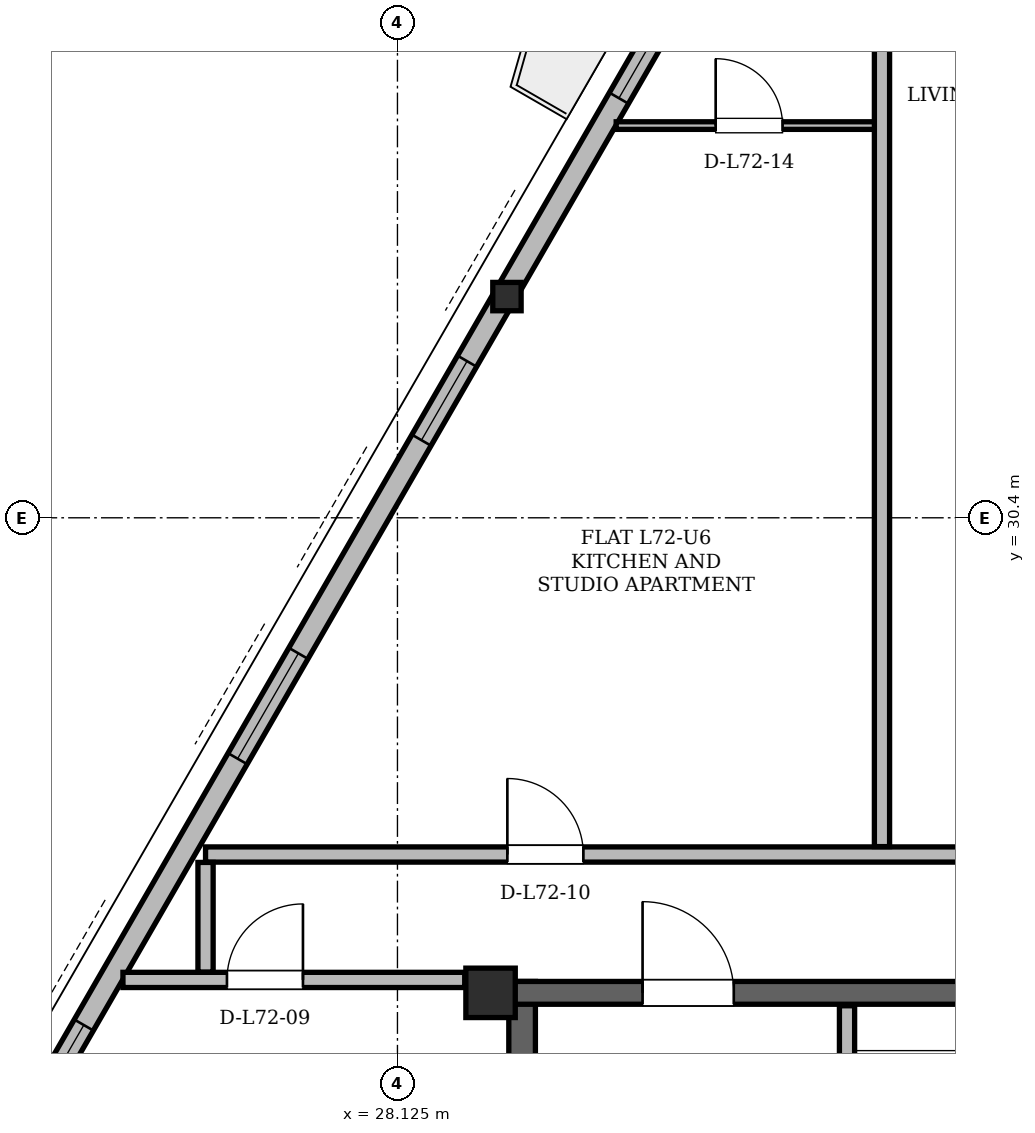
"""IFC4 building model, lengths in metres.
Left out: names, types, materials, properties, quantities, classifications, styles, units other than length and angle.
Written with IfcOpenShell. Run it as: python <this file> out.ifc"""

import sys

from ifc_helpers import new_model, si_unit, direction, frame, frame_2d, origin, origin_2d, place, context, subcontext, project, spatial, rectangle, hollow_rectangle, i_section, extrude, element, fill, save


model = new_model("IFC4")
c1 = context("Model", 3, precision=1e-05, world=origin(), true_north=direction((0.0, 1.0)))
c2 = subcontext(c1, "Body", "Model", "MODEL_VIEW")
j1 = project(units=[si_unit("LENGTHUNIT", "METRE"), si_unit("PLANEANGLEUNIT", "RADIAN")], contexts=[c1])
p1 = place(None, origin())
s1 = spatial("IfcSite", under=j1, at=p1, CompositionType="ELEMENT")
p2 = place(p1, origin())
s2 = spatial("IfcBuilding", under=s1, at=p2, CompositionType="ELEMENT")
p3 = place(p2, frame((0.0, 0.0, 273.3)))
s3 = spatial("IfcBuildingStorey", under=s2, at=p3, CompositionType="ELEMENT", Elevation=273.3)
p4 = place(p3, frame((29.35, 24.15, 0.0), z_axis=(0.0, 0.0, 1.0), x_axis=(1.0, 0.0, 0.0)))
e1 = element("IfcColumn", 1, at=p4, inside=s3, PredefinedType="COLUMN", context=c2, shape_type="SweptSolid", body=[
    extrude(hollow_rectangle(XDim=0.65, YDim=0.65, WallThickness=0.05, at=origin_2d()), origin(), (0.0, 0.0, 1.0), 3.9),
])
p5 = place(p3, frame((29.538, 33.321, 0.004), z_axis=(0.01430375695, -0.005458012521, 0.99988279945), x_axis=(0.356506481981, 0.934292849328, 0.0)))
e2 = element("IfcColumn", 2, at=p5, inside=s3, PredefinedType="COLUMN", context=c2, shape_type="SweptSolid", body=[
    extrude(i_section(OverallWidth=0.373, OverallDepth=0.373, WebThickness=0.016, FlangeThickness=0.026, at=origin_2d()), origin(), (0.0, 0.0, 1.0), 3.892),
])
p6 = place(p3, frame((29.765, 11.0, 0.0), z_axis=(0.0, 0.0, 1.0), x_axis=(0.0, 1.0, 0.0)))
e3 = element("IfcWall", 3, at=p6, inside=s3, PredefinedType="SHEAR", context=c2, shape_type="SweptSolid", body=[
    extrude(rectangle(XDim=13.3, YDim=0.35, at=frame_2d((6.65, 0.0))), origin(), (0.0, 0.0, 1.0), 3.68),
])
p7 = place(p3, frame((29.65, 24.15, 0.0), z_axis=(0.0, 0.0, 1.0), x_axis=(1.0, 0.0, 0.0)))
e4 = element("IfcWall", 4, at=p7, inside=s3, PredefinedType="SHEAR", context=c2, shape_type="SweptSolid", body=[
    extrude(rectangle(XDim=15.7, YDim=0.3, at=frame_2d((7.85, 0.0))), origin(), (0.0, 0.0, 1.0), 3.68),
])
p8 = place(p7, frame((1.7, 0.0, 0.0)))
e5 = element("IfcOpeningElement", 5, at=p8, cuts=e4, PredefinedType="OPENING", context=c2, shape_type="SweptSolid", body=[
    extrude(rectangle(XDim=1.2, YDim=2.2, at=frame_2d((0.6, 1.1))), frame((0.0, 0.15, 0.0), z_axis=(0.0, -1.0, 0.0), x_axis=(1.0, 0.0, 0.0)), (0.0, 0.0, 1.0), 0.3),
])
p9 = place(p7, frame((12.8, 0.0, 0.0)))
e6 = element("IfcOpeningElement", 6, at=p9, cuts=e4, PredefinedType="OPENING", context=c2, shape_type="SweptSolid", body=[
    extrude(rectangle(XDim=1.2, YDim=2.2, at=frame_2d((0.6, 1.1))), frame((0.0, 0.15, 0.0), z_axis=(0.0, -1.0, 0.0), x_axis=(1.0, 0.0, 0.0)), (0.0, 0.0, 1.0), 0.3),
])
p10 = place(p7, frame((7.4, 0.0, 0.0)))
e7 = element("IfcOpeningElement", 7, at=p10, cuts=e4, PredefinedType="OPENING", context=c2, shape_type="SweptSolid", body=[
    extrude(rectangle(XDim=0.9, YDim=2.05, at=frame_2d((0.45, 1.025))), frame((0.0, 0.15, 0.0), z_axis=(0.0, -1.0, 0.0), x_axis=(1.0, 0.0, 0.0)), (0.0, 0.0, 1.0), 0.3),
])
p11 = place(p3, frame((35.139, 43.023, 0.0), z_axis=(0.0, 0.0, 1.0), x_axis=(-0.499999381892, -0.866025760649, 0.0)))
e8 = element("IfcWall", 8, at=p11, inside=s3, PredefinedType="SOLIDWALL", context=c2, shape_type="SweptSolid", body=[
    extrude(rectangle(XDim=37.343, YDim=0.29, at=frame_2d((18.671, 0.0))), origin(), (0.0, 0.0, 1.0), 3.058),
])
p12 = place(p11, frame((3.639, 0.0, 0.0)))
e9 = element("IfcOpeningElement", 9, at=p12, cuts=e8, PredefinedType="OPENING", context=c2, shape_type="SweptSolid", body=[
    extrude(rectangle(XDim=1.5, YDim=2.2, at=frame_2d((0.75, 1.1))), frame((0.0, 0.145, 0.0), z_axis=(0.0, -1.0, 0.0), x_axis=(1.0, 0.0, 0.0)), (0.0, 0.0, 1.0), 0.29),
])
p13 = place(p11, frame((27.809, 0.0, 0.0)))
e10 = element("IfcOpeningElement", 10, at=p13, cuts=e8, PredefinedType="OPENING", context=c2, shape_type="SweptSolid", body=[
    extrude(rectangle(XDim=1.5, YDim=2.2, at=frame_2d((0.75, 1.1))), frame((0.0, 0.145, 0.0), z_axis=(0.0, -1.0, 0.0), x_axis=(1.0, 0.0, 0.0)), (0.0, 0.0, 1.0), 0.29),
])
p14 = place(p11, frame((22.281, 0.0, 0.85)))
e11 = element("IfcOpeningElement", 11, at=p14, cuts=e8, PredefinedType="OPENING", context=c2, shape_type="SweptSolid", body=[
    extrude(rectangle(XDim=2.6, YDim=1.95, at=frame_2d((1.3, 0.975))), frame((0.0, 0.145, 0.0), z_axis=(0.0, -1.0, 0.0), x_axis=(1.0, 0.0, 0.0)), (0.0, 0.0, 1.0), 0.29),
])
p15 = place(p11, frame((33.866, 0.0, 0.85)))
e12 = element("IfcOpeningElement", 12, at=p15, cuts=e8, PredefinedType="OPENING", context=c2, shape_type="SweptSolid", body=[
    extrude(rectangle(XDim=2.4, YDim=1.9, at=frame_2d((1.2, 0.95))), frame((0.0, 0.145, 0.0), z_axis=(0.0, -1.0, 0.0), x_axis=(1.0, 0.0, 0.0)), (0.0, 0.0, 1.0), 0.29),
])
p16 = place(p11, frame((12.197, 0.0, 0.85)))
e13 = element("IfcOpeningElement", 13, at=p16, cuts=e8, PredefinedType="OPENING", context=c2, shape_type="SweptSolid", body=[
    extrude(rectangle(XDim=1.2, YDim=1.48, at=frame_2d((0.6, 0.74))), frame((0.0, 0.145, 0.0), z_axis=(0.0, -1.0, 0.0), x_axis=(1.0, 0.0, 0.0)), (0.0, 0.0, 1.0), 0.29),
])
p17 = place(p11, frame((16.635, 0.0, 0.85)))
e14 = element("IfcOpeningElement", 14, at=p17, cuts=e8, PredefinedType="OPENING", context=c2, shape_type="SweptSolid", body=[
    extrude(rectangle(XDim=1.6, YDim=1.7, at=frame_2d((0.8, 0.85))), frame((0.0, 0.145, 0.0), z_axis=(0.0, -1.0, 0.0), x_axis=(1.0, 0.0, 0.0)), (0.0, 0.0, 1.0), 0.29),
])
p18 = place(p11, frame((7.001, 0.0, 0.85)))
e15 = element("IfcOpeningElement", 15, at=p18, cuts=e8, PredefinedType="OPENING", context=c2, shape_type="SweptSolid", body=[
    extrude(rectangle(XDim=1.2, YDim=1.48, at=frame_2d((0.6, 0.74))), frame((0.0, 0.145, 0.0), z_axis=(0.0, -1.0, 0.0), x_axis=(1.0, 0.0, 0.0)), (0.0, 0.0, 1.0), 0.29),
])
p19 = place(p3, frame((34.04, 19.48, 0.0), z_axis=(0.0, 0.0, 1.0), x_axis=(0.0, 1.0, 0.0)))
e16 = element("IfcWall", 16, at=p19, inside=s3, PredefinedType="PARTITIONING", context=c2, shape_type="SweptSolid", body=[
    extrude(rectangle(XDim=4.5, YDim=0.2, at=frame_2d((2.25, 0.0))), origin(), (0.0, 0.0, 1.0), 3.68),
])
p20 = place(p19, frame((2.12, 0.0, 0.0)))
e17 = element("IfcOpeningElement", 17, at=p20, cuts=e16, PredefinedType="OPENING", context=c2, shape_type="SweptSolid", body=[
    extrude(rectangle(XDim=1.1, YDim=2.2, at=frame_2d((0.55, 1.1))), frame((0.0, 0.1, 0.0), z_axis=(0.0, -1.0, 0.0), x_axis=(1.0, 0.0, 0.0)), (0.0, 0.0, 1.0), 0.2),
])
p21 = place(p3, frame((24.513, 24.32, 0.0), z_axis=(0.0, 0.0, 1.0), x_axis=(1.0, 0.0, 0.0)))
e18 = element("IfcWall", 18, at=p21, inside=s3, PredefinedType="PARTITIONING", context=c2, shape_type="SweptSolid", body=[
    extrude(rectangle(XDim=4.497, YDim=0.2, at=frame_2d((2.249, 0.0))), origin(), (0.0, 0.0, 1.0), 3.68),
])
p22 = place(p21, frame((1.368, 0.0, 0.0)))
e19 = element("IfcOpeningElement", 19, at=p22, cuts=e18, PredefinedType="OPENING", context=c2, shape_type="SweptSolid", body=[
    extrude(rectangle(XDim=1.0, YDim=2.18, at=frame_2d((0.5, 1.09))), frame((0.0, 0.1, 0.0), z_axis=(0.0, -1.0, 0.0), x_axis=(1.0, 0.0, 0.0)), (0.0, 0.0, 1.0), 0.2),
])
p23 = place(p3, frame((25.6, 25.97, 0.0), z_axis=(0.0, 0.0, 1.0), x_axis=(1.0, 0.0, 0.0)))
e20 = element("IfcWall", 20, at=p23, inside=s3, PredefinedType="PARTITIONING", context=c2, shape_type="SweptSolid", body=[
    extrude(rectangle(XDim=21.85, YDim=0.2, at=frame_2d((10.925, 0.0))), origin(), (0.0, 0.0, 1.0), 3.266),
])
p24 = place(p23, frame((3.971, 0.0, 0.0)))
e21 = element("IfcOpeningElement", 21, at=p24, cuts=e20, PredefinedType="OPENING", context=c2, shape_type="SweptSolid", body=[
    extrude(rectangle(XDim=1.0, YDim=2.18, at=frame_2d((0.5, 1.09))), frame((0.0, 0.1, 0.0), z_axis=(0.0, -1.0, 0.0), x_axis=(1.0, 0.0, 0.0)), (0.0, 0.0, 1.0), 0.2),
])
p25 = place(p23, frame((11.388, 0.0, 0.0)))
e22 = element("IfcOpeningElement", 22, at=p25, cuts=e20, PredefinedType="OPENING", context=c2, shape_type="SweptSolid", body=[
    extrude(rectangle(XDim=1.0, YDim=2.18, at=frame_2d((0.5, 1.09))), frame((0.0, 0.1, 0.0), z_axis=(0.0, -1.0, 0.0), x_axis=(1.0, 0.0, 0.0)), (0.0, 0.0, 1.0), 0.2),
])
p26 = place(p23, frame((18.78, 0.0, 0.0)))
e23 = element("IfcOpeningElement", 23, at=p26, cuts=e20, PredefinedType="OPENING", context=c2, shape_type="SweptSolid", body=[
    extrude(rectangle(XDim=1.0, YDim=2.18, at=frame_2d((0.5, 1.09))), frame((0.0, 0.1, 0.0), z_axis=(0.0, -1.0, 0.0), x_axis=(1.0, 0.0, 0.0)), (0.0, 0.0, 1.0), 0.2),
])
p27 = place(p3, frame((31.003, 35.56, 0.0), z_axis=(0.0, 0.0, 1.0), x_axis=(1.0, 0.0, 0.0)))
e24 = element("IfcWall", 24, at=p27, inside=s3, PredefinedType="PARTITIONING", context=c2, shape_type="SweptSolid", body=[
    extrude(rectangle(XDim=3.579, YDim=0.1, at=frame_2d((1.79, 0.0))), origin(), (0.0, 0.0, 1.0), 3.68),
])
p28 = place(p27, frame((1.309, 0.0, 0.0)))
e25 = element("IfcOpeningElement", 25, at=p28, cuts=e24, PredefinedType="OPENING", context=c2, shape_type="SweptSolid", body=[
    extrude(rectangle(XDim=0.88, YDim=2.08, at=frame_2d((0.44, 1.04))), frame((0.0, 0.05, 0.0), z_axis=(0.0, -1.0, 0.0), x_axis=(1.0, 0.0, 0.0)), (0.0, 0.0, 1.0), 0.1),
])
p29 = place(p3, frame((25.6, 24.424, 0.0), z_axis=(0.0, 0.0, 1.0), x_axis=(0.0, 1.0, 0.0)))
e26 = element("IfcWall", 26, at=p29, inside=s3, PredefinedType="PARTITIONING", context=c2, shape_type="SweptSolid", body=[
    extrude(rectangle(XDim=1.442, YDim=0.2, at=frame_2d((0.721, 0.0))), origin(), (0.0, 0.0, 1.0), 3.68),
])
p30 = place(p3, frame((34.5, 26.074, 0.0), z_axis=(0.0, 0.0, 1.0), x_axis=(0.0, 1.0, 0.0)))
e27 = element("IfcWall", 27, at=p30, inside=s3, PredefinedType="PARTITIONING", context=c2, shape_type="SweptSolid", body=[
    extrude(rectangle(XDim=15.544, YDim=0.2, at=frame_2d((7.772, 0.0))), origin(), (0.0, 0.0, 1.0), 3.058),
])
p31 = place(p14, origin())
e28 = element("IfcWindow", 28, at=p31, inside=s3, PartitioningType="SINGLE_PANEL", PredefinedType="WINDOW", context=c2, shape_type="SweptSolid", body=[
    extrude(rectangle(XDim=2.6, YDim=1.95, at=frame_2d((1.3, 0.975))), frame((0.0, 0.03, 0.0), z_axis=(0.0, -1.0, 0.0), x_axis=(1.0, 0.0, 0.0)), (0.0, 0.0, 1.0), 0.06),
])
fill(e11, e28)
p32 = place(p16, origin())
e29 = element("IfcWindow", 29, at=p32, inside=s3, PartitioningType="SINGLE_PANEL", PredefinedType="WINDOW", context=c2, shape_type="SweptSolid", body=[
    extrude(rectangle(XDim=1.2, YDim=1.48, at=frame_2d((0.6, 0.74))), frame((0.0, 0.03, 0.0), z_axis=(0.0, -1.0, 0.0), x_axis=(1.0, 0.0, 0.0)), (0.0, 0.0, 1.0), 0.06),
])
fill(e13, e29)
p33 = place(p17, origin())
e30 = element("IfcWindow", 30, at=p33, inside=s3, PartitioningType="SINGLE_PANEL", PredefinedType="WINDOW", context=c2, shape_type="SweptSolid", body=[
    extrude(rectangle(XDim=1.6, YDim=1.7, at=frame_2d((0.8, 0.85))), frame((0.0, 0.03, 0.0), z_axis=(0.0, -1.0, 0.0), x_axis=(1.0, 0.0, 0.0)), (0.0, 0.0, 1.0), 0.06),
])
fill(e14, e30)
p34 = place(p18, origin())
e31 = element("IfcWindow", 31, at=p34, inside=s3, PartitioningType="SINGLE_PANEL", PredefinedType="WINDOW", context=c2, shape_type="SweptSolid", body=[
    extrude(rectangle(XDim=1.2, YDim=1.48, at=frame_2d((0.6, 0.74))), frame((0.0, 0.03, 0.0), z_axis=(0.0, -1.0, 0.0), x_axis=(1.0, 0.0, 0.0)), (0.0, 0.0, 1.0), 0.06),
])
fill(e15, e31)
p35 = place(p8, origin())
e32 = element("IfcDoor", 32, at=p35, inside=s3, OperationType="SINGLE_SWING_LEFT", PredefinedType="DOOR", context=c2, shape_type="SweptSolid", body=[
    extrude(rectangle(XDim=1.2, YDim=2.2, at=frame_2d((0.6, 1.1))), frame((0.0, 0.025, 0.0), z_axis=(0.0, -1.0, 0.0), x_axis=(1.0, 0.0, 0.0)), (0.0, 0.0, 1.0), 0.05),
])
fill(e5, e32)
p36 = place(p22, origin())
e33 = element("IfcDoor", 33, at=p36, inside=s3, OperationType="SINGLE_SWING_RIGHT", PredefinedType="DOOR", context=c2, shape_type="SweptSolid", body=[
    extrude(rectangle(XDim=1.0, YDim=2.18, at=frame_2d((0.5, 1.09))), frame((0.0, 0.025, 0.0), z_axis=(0.0, -1.0, 0.0), x_axis=(1.0, 0.0, 0.0)), (0.0, 0.0, 1.0), 0.05),
])
fill(e19, e33)
p37 = place(p24, origin())
e34 = element("IfcDoor", 34, at=p37, inside=s3, OperationType="SINGLE_SWING_LEFT", PredefinedType="DOOR", context=c2, shape_type="SweptSolid", body=[
    extrude(rectangle(XDim=1.0, YDim=2.18, at=frame_2d((0.5, 1.09))), frame((0.0, 0.025, 0.0), z_axis=(0.0, -1.0, 0.0), x_axis=(1.0, 0.0, 0.0)), (0.0, 0.0, 1.0), 0.05),
])
fill(e21, e34)
p38 = place(p28, origin())
e35 = element("IfcDoor", 35, at=p38, inside=s3, OperationType="SINGLE_SWING_LEFT", PredefinedType="DOOR", context=c2, shape_type="SweptSolid", body=[
    extrude(rectangle(XDim=0.88, YDim=2.08, at=frame_2d((0.44, 1.04))), frame((0.0, 0.025, 0.0), z_axis=(0.0, -1.0, 0.0), x_axis=(1.0, 0.0, 0.0)), (0.0, 0.0, 1.0), 0.05),
])
fill(e25, e35)
save(model, sys.argv[1])
